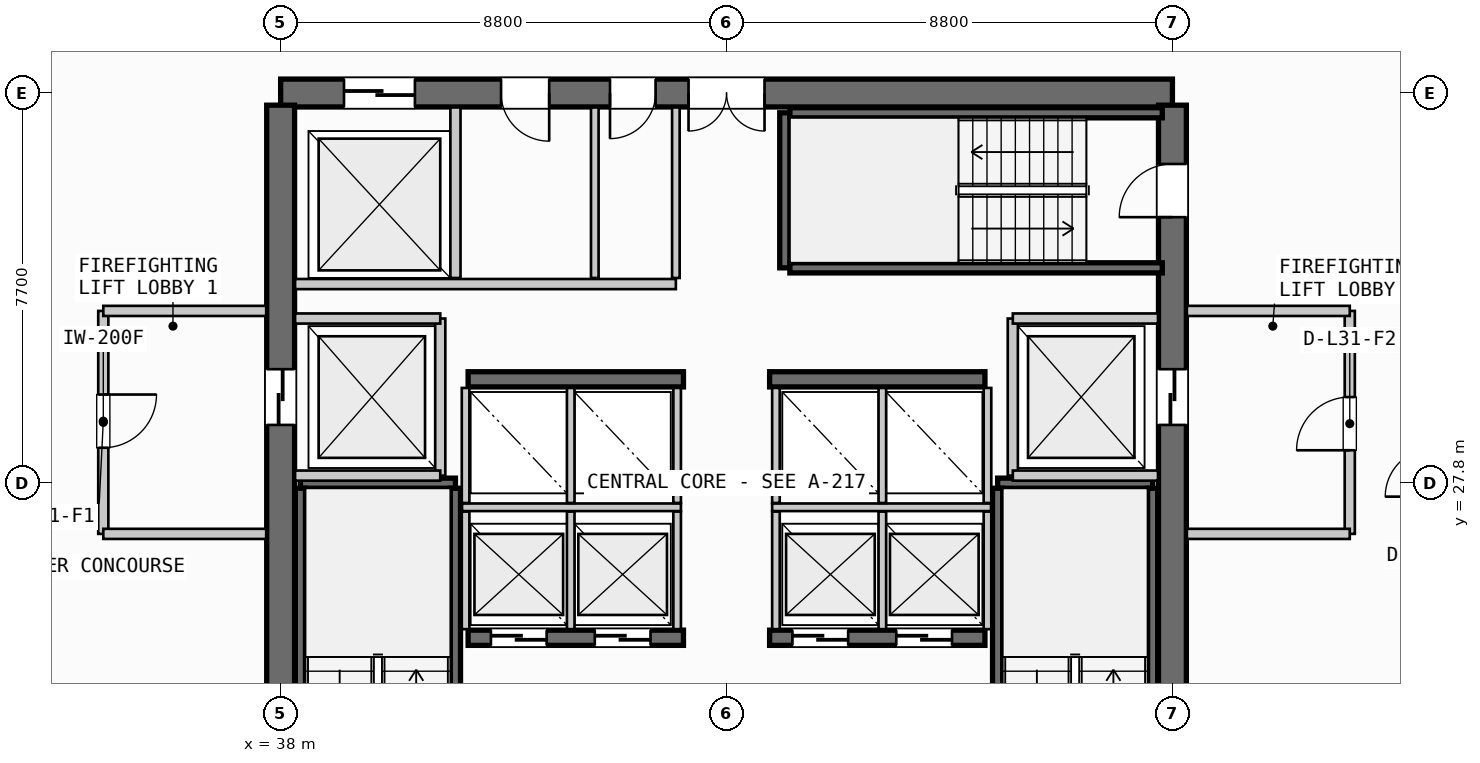
"""IFC4 building model, lengths in metres.
Left out: names, types, materials, properties, quantities, classifications, styles, units other than length and angle.
Written with IfcOpenShell. Run it as: python <this file> out.ifc"""

import sys

from ifc_helpers import new_model, si_unit, direction, frame, frame_2d, origin, place, context, subcontext, project, spatial, rectangle, extrude, source, transform, mapped, element, fill, save


model = new_model("IFC4")
c1 = context("Model", 3, precision=1e-05, world=origin(), true_north=direction((0.0, 1.0)))
c2 = subcontext(c1, "Body", "Model", "MODEL_VIEW")
j1 = project(units=[si_unit("LENGTHUNIT", "METRE"), si_unit("PLANEANGLEUNIT", "RADIAN")], contexts=[c1])
p1 = place(None, origin())
s1 = spatial("IfcSite", under=j1, at=p1, CompositionType="ELEMENT")
p2 = place(p1, origin())
s2 = spatial("IfcBuilding", under=s1, at=p2, CompositionType="ELEMENT")
p3 = place(p2, frame((0.0, 0.0, 125.2)))
s3 = spatial("IfcBuildingStorey", under=s2, at=p3, CompositionType="ELEMENT", Elevation=125.2)
p4 = place(p3, frame((55.6, 35.5, 0.0), z_axis=(0.0, 0.0, 1.0), x_axis=(-1.0, 0.0, 0.0)))
e1 = element("IfcWall", 1, at=p4, inside=s3, PredefinedType="SHEAR", context=c2, shape_type="SweptSolid", body=[
    extrude(rectangle(XDim=17.6, YDim=0.55, at=frame_2d((8.8, 0.0))), origin(), (0.0, 0.0, 1.0), 3.35),
])
p5 = place(p4, frame((8.05, 0.0, 0.0)))
e2 = element("IfcOpeningElement", 2, at=p5, cuts=e1, PredefinedType="OPENING", context=c2, shape_type="SweptSolid", body=[
    extrude(rectangle(XDim=1.5, YDim=2.2, at=frame_2d((0.75, 1.1))), frame((0.0, 0.285, 0.0), z_axis=(0.0, -1.0, 0.0), x_axis=(1.0, 0.0, 0.0)), (0.0, 0.0, 1.0), 0.57),
])
p6 = place(p4, frame((14.95, 0.0, 0.0)))
e3 = element("IfcOpeningElement", 3, at=p6, cuts=e1, PredefinedType="OPENING", context=c2, shape_type="SweptSolid", body=[
    extrude(rectangle(XDim=1.4, YDim=2.3, at=frame_2d((0.7, 1.15))), frame((0.0, 0.285, 0.0), z_axis=(0.0, -1.0, 0.0), x_axis=(1.0, 0.0, 0.0)), (0.0, 0.0, 1.0), 0.57),
])
p7 = place(p4, frame((12.3, 0.0, 0.0)))
e4 = element("IfcOpeningElement", 4, at=p7, cuts=e1, PredefinedType="OPENING", context=c2, shape_type="SweptSolid", body=[
    extrude(rectangle(XDim=0.95, YDim=2.15, at=frame_2d((0.475, 1.075))), frame((0.0, 0.285, 0.0), z_axis=(0.0, -1.0, 0.0), x_axis=(1.0, 0.0, 0.0)), (0.0, 0.0, 1.0), 0.57),
])
p8 = place(p4, frame((10.2, 0.0, 0.0)))
e5 = element("IfcOpeningElement", 5, at=p8, cuts=e1, PredefinedType="OPENING", context=c2, shape_type="SweptSolid", body=[
    extrude(rectangle(XDim=0.9, YDim=2.15, at=frame_2d((0.45, 1.075))), frame((0.0, 0.285, 0.0), z_axis=(0.0, -1.0, 0.0), x_axis=(1.0, 0.0, 0.0)), (0.0, 0.0, 1.0), 0.57),
])
p9 = place(p3, frame((38.0, 35.26, 0.0), z_axis=(0.0, 0.0, 1.0), x_axis=(0.0, -1.0, 0.0)))
e6 = element("IfcWall", 6, at=p9, inside=s3, PredefinedType="SHEAR", context=c2, shape_type="SweptSolid", body=[
    extrude(rectangle(XDim=14.92, YDim=0.55, at=frame_2d((7.46, 0.0))), origin(), (0.0, 0.0, 1.0), 3.35),
])
p10 = place(p9, frame((5.21, 0.0, 0.0)))
e7 = element("IfcOpeningElement", 7, at=p10, cuts=e6, PredefinedType="OPENING", context=c2, shape_type="SweptSolid", body=[
    extrude(rectangle(XDim=1.1, YDim=2.2, at=frame_2d((0.55, 1.1))), frame((0.0, 0.285, 0.0), z_axis=(0.0, -1.0, 0.0), x_axis=(1.0, 0.0, 0.0)), (0.0, 0.0, 1.0), 0.57),
])
p11 = place(p3, frame((55.6, 20.34, 0.0), z_axis=(0.0, 0.0, 1.0), x_axis=(0.0, 1.0, 0.0)))
e8 = element("IfcWall", 8, at=p11, inside=s3, PredefinedType="SHEAR", context=c2, shape_type="SweptSolid", body=[
    extrude(rectangle(XDim=14.92, YDim=0.55, at=frame_2d((7.46, 0.0))), origin(), (0.0, 0.0, 1.0), 3.35),
])
p12 = place(p11, frame((12.71, 0.0, 0.0)))
e9 = element("IfcOpeningElement", 9, at=p12, cuts=e8, PredefinedType="OPENING", context=c2, shape_type="SweptSolid", body=[
    extrude(rectangle(XDim=1.05, YDim=2.15, at=frame_2d((0.525, 1.075))), frame((0.0, 0.285, 0.0), z_axis=(0.0, -1.0, 0.0), x_axis=(1.0, 0.0, 0.0)), (0.0, 0.0, 1.0), 0.57),
])
p13 = place(p11, frame((8.61, 0.0, 0.0)))
e10 = element("IfcOpeningElement", 10, at=p13, cuts=e8, PredefinedType="OPENING", context=c2, shape_type="SweptSolid", body=[
    extrude(rectangle(XDim=1.1, YDim=2.2, at=frame_2d((0.55, 1.1))), frame((0.0, 0.285, 0.0), z_axis=(0.0, -1.0, 0.0), x_axis=(1.0, 0.0, 0.0)), (0.0, 0.0, 1.0), 0.57),
])
p14 = place(p3, frame((41.7, 24.75, 0.0), z_axis=(0.0, 0.0, 1.0), x_axis=(1.0, 0.0, 0.0)))
e11 = element("IfcWall", 11, at=p14, inside=s3, PredefinedType="SHEAR", context=c2, shape_type="SweptSolid", body=[
    extrude(rectangle(XDim=4.25, YDim=0.3, at=frame_2d((2.125, 0.0))), origin(), (0.0, 0.0, 1.0), 3.35),
])
p15 = place(p14, frame((0.45, 0.0, 0.0)))
e12 = element("IfcOpeningElement", 12, at=p15, cuts=e11, PredefinedType="OPENING", context=c2, shape_type="SweptSolid", body=[
    extrude(rectangle(XDim=1.1, YDim=2.2, at=frame_2d((0.55, 1.1))), frame((0.0, 0.16, 0.0), z_axis=(0.0, -1.0, 0.0), x_axis=(1.0, 0.0, 0.0)), (0.0, 0.0, 1.0), 0.32),
])
p16 = place(p14, frame((2.5, 0.0, 0.0)))
e13 = element("IfcOpeningElement", 13, at=p16, cuts=e11, PredefinedType="OPENING", context=c2, shape_type="SweptSolid", body=[
    extrude(rectangle(XDim=1.1, YDim=2.2, at=frame_2d((0.55, 1.1))), frame((0.0, 0.16, 0.0), z_axis=(0.0, -1.0, 0.0), x_axis=(1.0, 0.0, 0.0)), (0.0, 0.0, 1.0), 0.32),
])
p17 = place(p3, frame((47.65, 24.75, 0.0), z_axis=(0.0, 0.0, 1.0), x_axis=(1.0, 0.0, 0.0)))
e14 = element("IfcWall", 14, at=p17, inside=s3, PredefinedType="SHEAR", context=c2, shape_type="SweptSolid", body=[
    extrude(rectangle(XDim=4.25, YDim=0.3, at=frame_2d((2.125, 0.0))), origin(), (0.0, 0.0, 1.0), 3.35),
])
p18 = place(p17, frame((0.45, 0.0, 0.0)))
e15 = element("IfcOpeningElement", 15, at=p18, cuts=e14, PredefinedType="OPENING", context=c2, shape_type="SweptSolid", body=[
    extrude(rectangle(XDim=1.1, YDim=2.2, at=frame_2d((0.55, 1.1))), frame((0.0, 0.16, 0.0), z_axis=(0.0, -1.0, 0.0), x_axis=(1.0, 0.0, 0.0)), (0.0, 0.0, 1.0), 0.32),
])
p19 = place(p17, frame((2.5, 0.0, 0.0)))
e16 = element("IfcOpeningElement", 16, at=p19, cuts=e14, PredefinedType="OPENING", context=c2, shape_type="SweptSolid", body=[
    extrude(rectangle(XDim=1.1, YDim=2.2, at=frame_2d((0.55, 1.1))), frame((0.0, 0.16, 0.0), z_axis=(0.0, -1.0, 0.0), x_axis=(1.0, 0.0, 0.0)), (0.0, 0.0, 1.0), 0.32),
])
for number, where, z_axis, x_axis in (
    (17, (41.7, 29.85, 0.0), (0.0, 0.0, 1.0), (1.0, 0.0, 0.0)),
    (18, (47.65, 29.85, 0.0), (0.0, 0.0, 1.0), (1.0, 0.0, 0.0)),
):
    element("IfcWall", number, at=place(p3, frame(where, z_axis=z_axis, x_axis=x_axis)), inside=s3, PredefinedType="SHEAR", context=c2, shape_type="SweptSolid", body=[
        extrude(rectangle(XDim=4.25, YDim=0.3, at=frame_2d((2.125, 0.0))), origin(), (0.0, 0.0, 1.0), 3.35),
    ])
p20 = place(p3, frame((38.39, 27.8, 0.0), z_axis=(0.0, 0.0, 1.0), x_axis=(1.0, 0.0, 0.0)))
e19 = element("IfcWall", 19, at=p20, inside=s3, PredefinedType="SHEAR", context=c2, shape_type="SweptSolid", body=[
    extrude(rectangle(XDim=3.06, YDim=0.2, at=frame_2d((1.53, 0.0))), origin(), (0.0, 0.0, 1.0), 3.35),
])
for number, where, z_axis, x_axis in (
    (20, (41.45, 27.7, 0.0), (0.0, 0.0, 1.0), (0.0, -1.0, 0.0)),
    (21, (38.39, 20.35, 0.0), (0.0, 0.0, 1.0), (0.0, 1.0, 0.0)),
):
    element("IfcWall", number, at=place(p3, frame(where, z_axis=z_axis, x_axis=x_axis)), inside=s3, PredefinedType="SHEAR", context=c2, shape_type="SweptSolid", body=[
        extrude(rectangle(XDim=7.35, YDim=0.2, at=frame_2d((3.675, 0.0))), origin(), (0.0, 0.0, 1.0), 3.35),
    ])
p21 = place(p3, frame((52.15, 27.8, 0.0), z_axis=(0.0, 0.0, 1.0), x_axis=(1.0, 0.0, 0.0)))
e22 = element("IfcWall", 22, at=p21, inside=s3, PredefinedType="SHEAR", context=c2, shape_type="SweptSolid", body=[
    extrude(rectangle(XDim=3.06, YDim=0.2, at=frame_2d((1.53, 0.0))), origin(), (0.0, 0.0, 1.0), 3.35),
])
for number, where, z_axis, x_axis in (
    (23, (55.21, 27.7, 0.0), (0.0, 0.0, 1.0), (0.0, -1.0, 0.0)),
    (24, (52.15, 20.35, 0.0), (0.0, 0.0, 1.0), (0.0, 1.0, 0.0)),
):
    element("IfcWall", number, at=place(p3, frame(where, z_axis=z_axis, x_axis=x_axis)), inside=s3, PredefinedType="SHEAR", context=c2, shape_type="SweptSolid", body=[
        extrude(rectangle(XDim=7.35, YDim=0.2, at=frame_2d((3.675, 0.0))), origin(), (0.0, 0.0, 1.0), 3.35),
    ])
p22 = place(p3, frame((47.95, 32.05, 0.0), z_axis=(0.0, 0.0, 1.0), x_axis=(0.0, 1.0, 0.0)))
e25 = element("IfcWall", 25, at=p22, inside=s3, PredefinedType="SHEAR", context=c2, shape_type="SweptSolid", body=[
    extrude(rectangle(XDim=3.06, YDim=0.2, at=frame_2d((1.53, 0.0))), origin(), (0.0, 0.0, 1.0), 3.35),
])
for number, where, z_axis, x_axis in (
    (26, (48.05, 35.11, 0.0), (0.0, 0.0, 1.0), (1.0, 0.0, 0.0)),
    (27, (55.4, 32.05, 0.0), (0.0, 0.0, 1.0), (-1.0, 0.0, 0.0)),
):
    element("IfcWall", number, at=place(p3, frame(where, z_axis=z_axis, x_axis=x_axis)), inside=s3, PredefinedType="SHEAR", context=c2, shape_type="SweptSolid", body=[
        extrude(rectangle(XDim=7.35, YDim=0.2, at=frame_2d((3.675, 0.0))), origin(), (0.0, 0.0, 1.0), 3.35),
    ])
p23 = place(p3, frame((41.15, 27.95, 0.0), z_axis=(0.0, 0.0, 1.0), x_axis=(0.0, 1.0, 0.0)))
e28 = element("IfcWall", 28, at=p23, inside=s3, PredefinedType="PARTITIONING", context=c2, shape_type="SweptSolid", body=[
    extrude(rectangle(XDim=3.1, YDim=0.2, at=frame_2d((1.55, 0.0))), origin(), (0.0, 0.0, 1.0), 2.635),
])
for number, where, z_axis, x_axis in (
    (29, (38.285, 27.95, 0.0), (0.0, 0.0, 1.0), (1.0, 0.0, 0.0)),
    (30, (38.285, 31.05, 0.0), (0.0, 0.0, 1.0), (1.0, 0.0, 0.0)),
):
    element("IfcWall", number, at=place(p3, frame(where, z_axis=z_axis, x_axis=x_axis)), inside=s3, PredefinedType="PARTITIONING", context=c2, shape_type="SweptSolid", body=[
        extrude(rectangle(XDim=2.865, YDim=0.2, at=frame_2d((1.433, 0.0))), origin(), (0.0, 0.0, 1.0), 2.635),
    ])
p24 = place(p3, frame((34.5, 31.2, 0.0), z_axis=(0.0, 0.0, 1.0), x_axis=(0.0, -1.0, 0.0)))
e31 = element("IfcWall", 31, at=p24, inside=s3, PredefinedType="PARTITIONING", context=c2, shape_type="SweptSolid", body=[
    extrude(rectangle(XDim=4.4, YDim=0.2, at=frame_2d((2.2, 0.0))), origin(), (0.0, 0.0, 1.0), 2.635),
])
p25 = place(p24, frame((1.65, 0.0, 0.0)))
e32 = element("IfcOpeningElement", 32, at=p25, cuts=e31, PredefinedType="OPENING", context=c2, shape_type="SweptSolid", body=[
    extrude(rectangle(XDim=1.05, YDim=2.15, at=frame_2d((0.525, 1.075))), frame((0.0, 0.11, 0.0), z_axis=(0.0, -1.0, 0.0), x_axis=(1.0, 0.0, 0.0)), (0.0, 0.0, 1.0), 0.22),
])
for number, where, z_axis, x_axis in (
    (33, (34.5, 26.8, 0.0), (0.0, 0.0, 1.0), (1.0, 0.0, 0.0)),
    (34, (34.5, 31.2, 0.0), (0.0, 0.0, 1.0), (1.0, 0.0, 0.0)),
):
    element("IfcWall", number, at=place(p3, frame(where, z_axis=z_axis, x_axis=x_axis)), inside=s3, PredefinedType="PARTITIONING", context=c2, shape_type="SweptSolid", body=[
        extrude(rectangle(XDim=3.215, YDim=0.2, at=frame_2d((1.607, 0.0))), origin(), (0.0, 0.0, 1.0), 2.635),
    ])
p26 = place(p3, frame((52.45, 27.95, 0.0), z_axis=(0.0, 0.0, 1.0), x_axis=(0.0, 1.0, 0.0)))
e35 = element("IfcWall", 35, at=p26, inside=s3, PredefinedType="PARTITIONING", context=c2, shape_type="SweptSolid", body=[
    extrude(rectangle(XDim=3.1, YDim=0.2, at=frame_2d((1.55, 0.0))), origin(), (0.0, 0.0, 1.0), 2.635),
])
for number, where, z_axis, x_axis in (
    (36, (52.45, 27.95, 0.0), (0.0, 0.0, 1.0), (1.0, 0.0, 0.0)),
    (37, (52.45, 31.05, 0.0), (0.0, 0.0, 1.0), (1.0, 0.0, 0.0)),
):
    element("IfcWall", number, at=place(p3, frame(where, z_axis=z_axis, x_axis=x_axis)), inside=s3, PredefinedType="PARTITIONING", context=c2, shape_type="SweptSolid", body=[
        extrude(rectangle(XDim=2.865, YDim=0.2, at=frame_2d((1.433, 0.0))), origin(), (0.0, 0.0, 1.0), 2.635),
    ])
p27 = place(p3, frame((59.1, 26.8, 0.0), z_axis=(0.0, 0.0, 1.0), x_axis=(0.0, 1.0, 0.0)))
e38 = element("IfcWall", 38, at=p27, inside=s3, PredefinedType="PARTITIONING", context=c2, shape_type="SweptSolid", body=[
    extrude(rectangle(XDim=4.4, YDim=0.2, at=frame_2d((2.2, 0.0))), origin(), (0.0, 0.0, 1.0), 2.635),
])
p28 = place(p27, frame((1.65, 0.0, 0.0)))
e39 = element("IfcOpeningElement", 39, at=p28, cuts=e38, PredefinedType="OPENING", context=c2, shape_type="SweptSolid", body=[
    extrude(rectangle(XDim=1.05, YDim=2.15, at=frame_2d((0.525, 1.075))), frame((0.0, 0.11, 0.0), z_axis=(0.0, -1.0, 0.0), x_axis=(1.0, 0.0, 0.0)), (0.0, 0.0, 1.0), 0.22),
])
for number, where, z_axis, x_axis in (
    (40, (55.885, 26.8, 0.0), (0.0, 0.0, 1.0), (1.0, 0.0, 0.0)),
    (41, (55.885, 31.2, 0.0), (0.0, 0.0, 1.0), (1.0, 0.0, 0.0)),
):
    element("IfcWall", number, at=place(p3, frame(where, z_axis=z_axis, x_axis=x_axis)), inside=s3, PredefinedType="PARTITIONING", context=c2, shape_type="SweptSolid", body=[
        extrude(rectangle(XDim=3.215, YDim=0.2, at=frame_2d((1.607, 0.0))), origin(), (0.0, 0.0, 1.0), 2.635),
    ])
p29 = place(p3, frame((41.58, 27.325, 0.0), z_axis=(0.0, 0.0, 1.0), x_axis=(1.0, 0.0, 0.0)))
e42 = element("IfcWall", 42, at=p29, inside=s3, PredefinedType="PARTITIONING", context=c2, shape_type="SweptSolid", body=[
    extrude(rectangle(XDim=4.32, YDim=0.15, at=frame_2d((2.16, 0.0))), origin(), (0.0, 0.0, 1.0), 2.635),
])
p30 = place(p3, frame((47.7, 27.325, 0.0), z_axis=(0.0, 0.0, 1.0), x_axis=(1.0, 0.0, 0.0)))
e43 = element("IfcWall", 43, at=p30, inside=s3, PredefinedType="PARTITIONING", context=c2, shape_type="SweptSolid", body=[
    extrude(rectangle(XDim=4.32, YDim=0.15, at=frame_2d((2.16, 0.0))), origin(), (0.0, 0.0, 1.0), 2.635),
])
for number, where, z_axis, x_axis in (
    (44, (41.65, 24.92, 0.0), (0.0, 0.0, 1.0), (0.0, 1.0, 0.0)),
    (45, (43.725, 24.92, 0.0), (0.0, 0.0, 1.0), (0.0, 1.0, 0.0)),
    (46, (45.825, 24.92, 0.0), (0.0, 0.0, 1.0), (0.0, 1.0, 0.0)),
    (47, (47.775, 24.92, 0.0), (0.0, 0.0, 1.0), (0.0, 1.0, 0.0)),
    (48, (49.875, 24.92, 0.0), (0.0, 0.0, 1.0), (0.0, 1.0, 0.0)),
    (49, (51.95, 24.92, 0.0), (0.0, 0.0, 1.0), (0.0, 1.0, 0.0)),
):
    element("IfcWall", number, at=place(p3, frame(where, z_axis=z_axis, x_axis=x_axis)), inside=s3, PredefinedType="PARTITIONING", context=c2, shape_type="SweptSolid", body=[
        extrude(rectangle(XDim=2.32, YDim=0.15, at=frame_2d((1.16, 0.0))), origin(), (0.0, 0.0, 1.0), 2.635),
    ])
for number, where, z_axis, x_axis in (
    (50, (41.65, 27.41, 0.0), (0.0, 0.0, 1.0), (0.0, 1.0, 0.0)),
    (51, (43.725, 27.41, 0.0), (0.0, 0.0, 1.0), (0.0, 1.0, 0.0)),
    (52, (45.825, 27.41, 0.0), (0.0, 0.0, 1.0), (0.0, 1.0, 0.0)),
    (53, (47.775, 27.41, 0.0), (0.0, 0.0, 1.0), (0.0, 1.0, 0.0)),
    (54, (49.875, 27.41, 0.0), (0.0, 0.0, 1.0), (0.0, 1.0, 0.0)),
    (55, (51.95, 27.41, 0.0), (0.0, 0.0, 1.0), (0.0, 1.0, 0.0)),
):
    element("IfcWall", number, at=place(p3, frame(where, z_axis=z_axis, x_axis=x_axis)), inside=s3, PredefinedType="PARTITIONING", context=c2, shape_type="SweptSolid", body=[
        extrude(rectangle(XDim=2.27, YDim=0.15, at=frame_2d((1.135, 0.0))), origin(), (0.0, 0.0, 1.0), 2.635),
    ])
p31 = place(p3, frame((41.45, 31.85, 0.0), z_axis=(0.0, 0.0, 1.0), x_axis=(0.0, 1.0, 0.0)))
e56 = element("IfcWall", 56, at=p31, inside=s3, PredefinedType="PARTITIONING", context=c2, shape_type="SweptSolid", body=[
    extrude(rectangle(XDim=3.365, YDim=0.2, at=frame_2d((1.683, 0.0))), origin(), (0.0, 0.0, 1.0), 2.635),
])
p32 = place(p3, frame((38.285, 31.73, 0.0), z_axis=(0.0, 0.0, 1.0), x_axis=(1.0, 0.0, 0.0)))
e57 = element("IfcWall", 57, at=p32, inside=s3, PredefinedType="PARTITIONING", context=c2, shape_type="SweptSolid", body=[
    extrude(rectangle(XDim=7.515, YDim=0.2, at=frame_2d((3.758, 0.0))), origin(), (0.0, 0.0, 1.0), 2.635),
])
p33 = place(p3, frame((45.8, 31.85, 0.0), z_axis=(0.0, 0.0, 1.0), x_axis=(0.0, 1.0, 0.0)))
e58 = element("IfcWall", 58, at=p33, inside=s3, PredefinedType="PARTITIONING", context=c2, shape_type="SweptSolid", body=[
    extrude(rectangle(XDim=3.365, YDim=0.15, at=frame_2d((1.683, 0.0))), origin(), (0.0, 0.0, 1.0), 2.635),
])
p34 = place(p3, frame((44.2, 31.85, 0.0), z_axis=(0.0, 0.0, 1.0), x_axis=(0.0, 1.0, 0.0)))
e59 = element("IfcWall", 59, at=p34, inside=s3, PredefinedType="PLUMBINGWALL", context=c2, shape_type="SweptSolid", body=[
    extrude(rectangle(XDim=3.365, YDim=0.15, at=frame_2d((1.683, 0.0))), origin(), (0.0, 0.0, 1.0), 2.635),
])
m1 = source(origin(), c2, "Body", "SweptSolid", [
    extrude(rectangle(XDim=1.05, YDim=2.15, at=frame_2d((0.525, 1.075))), frame((0.0, 0.025, 0.0), z_axis=(0.0, -1.0, 0.0), x_axis=(1.0, 0.0, 0.0)), (0.0, 0.0, 1.0), 0.05),
])
p35 = place(p12, origin())
e60 = element("IfcDoor", 60, at=p35, inside=s3, OperationType="SINGLE_SWING_LEFT", PredefinedType="DOOR", context=c2, shape_type="MappedRepresentation", body=[
    mapped(m1, transform((0.0, 0.0, 0.0), scale=1.0)),
])
fill(e9, e60)
m2 = source(origin(), c2, "Body", "SweptSolid", [
    extrude(rectangle(XDim=1.5, YDim=2.2, at=frame_2d((0.75, 1.1))), frame((0.0, 0.025, 0.0), z_axis=(0.0, -1.0, 0.0), x_axis=(1.0, 0.0, 0.0)), (0.0, 0.0, 1.0), 0.05),
])
p36 = place(p5, origin())
e61 = element("IfcDoor", 61, at=p36, inside=s3, OperationType="DOUBLE_DOOR_SINGLE_SWING", PredefinedType="DOOR", context=c2, shape_type="MappedRepresentation", body=[
    mapped(m2, transform((0.0, 0.0, 0.0), scale=1.0)),
])
fill(e2, e61)
m3 = source(origin(), c2, "Body", "SweptSolid", [
    extrude(rectangle(XDim=1.1, YDim=2.2, at=frame_2d((0.55, 1.1))), frame((0.0, 0.025, 0.0), z_axis=(0.0, -1.0, 0.0), x_axis=(1.0, 0.0, 0.0)), (0.0, 0.0, 1.0), 0.05),
])
p37 = place(p10, origin())
e62 = element("IfcDoor", 62, at=p37, inside=s3, OperationType="SLIDING_TO_LEFT", PredefinedType="DOOR", context=c2, shape_type="MappedRepresentation", body=[
    mapped(m3, transform((0.0, 0.0, 0.0), scale=1.0)),
])
fill(e7, e62)
p38 = place(p13, origin())
e63 = element("IfcDoor", 63, at=p38, inside=s3, OperationType="SLIDING_TO_RIGHT", PredefinedType="DOOR", context=c2, shape_type="MappedRepresentation", body=[
    mapped(m3, transform((0.0, 0.0, 0.0), scale=1.0)),
])
fill(e10, e63)
p39 = place(p15, origin())
e64 = element("IfcDoor", 64, at=p39, inside=s3, OperationType="SLIDING_TO_RIGHT", PredefinedType="DOOR", context=c2, shape_type="MappedRepresentation", body=[
    mapped(m3, transform((0.0, 0.0, 0.0), scale=1.0)),
])
fill(e12, e64)
p40 = place(p16, origin())
e65 = element("IfcDoor", 65, at=p40, inside=s3, OperationType="SLIDING_TO_RIGHT", PredefinedType="DOOR", context=c2, shape_type="MappedRepresentation", body=[
    mapped(m3, transform((0.0, 0.0, 0.0), scale=1.0)),
])
fill(e13, e65)
p41 = place(p18, origin())
e66 = element("IfcDoor", 66, at=p41, inside=s3, OperationType="SLIDING_TO_RIGHT", PredefinedType="DOOR", context=c2, shape_type="MappedRepresentation", body=[
    mapped(m3, transform((0.0, 0.0, 0.0), scale=1.0)),
])
fill(e15, e66)
p42 = place(p19, origin())
e67 = element("IfcDoor", 67, at=p42, inside=s3, OperationType="SLIDING_TO_RIGHT", PredefinedType="DOOR", context=c2, shape_type="MappedRepresentation", body=[
    mapped(m3, transform((0.0, 0.0, 0.0), scale=1.0)),
])
fill(e16, e67)
m4 = source(origin(), c2, "Body", "SweptSolid", [
    extrude(rectangle(XDim=1.4, YDim=2.3, at=frame_2d((0.7, 1.15))), frame((0.0, 0.025, 0.0), z_axis=(0.0, -1.0, 0.0), x_axis=(1.0, 0.0, 0.0)), (0.0, 0.0, 1.0), 0.05),
])
p43 = place(p6, origin())
e68 = element("IfcDoor", 68, at=p43, inside=s3, OperationType="SLIDING_TO_RIGHT", PredefinedType="DOOR", context=c2, shape_type="MappedRepresentation", body=[
    mapped(m4, transform((0.0, 0.0, 0.0), scale=1.0)),
])
fill(e3, e68)
m5 = source(origin(), c2, "Body", "SweptSolid", [
    extrude(rectangle(XDim=0.95, YDim=2.15, at=frame_2d((0.475, 1.075))), frame((0.0, 0.025, 0.0), z_axis=(0.0, -1.0, 0.0), x_axis=(1.0, 0.0, 0.0)), (0.0, 0.0, 1.0), 0.05),
])
p44 = place(p7, origin())
e69 = element("IfcDoor", 69, at=p44, inside=s3, OperationType="SINGLE_SWING_LEFT", PredefinedType="DOOR", context=c2, shape_type="MappedRepresentation", body=[
    mapped(m5, transform((0.0, 0.0, 0.0), scale=1.0)),
])
fill(e4, e69)
m6 = source(origin(), c2, "Body", "SweptSolid", [
    extrude(rectangle(XDim=0.9, YDim=2.15, at=frame_2d((0.45, 1.075))), frame((0.0, 0.025, 0.0), z_axis=(0.0, -1.0, 0.0), x_axis=(1.0, 0.0, 0.0)), (0.0, 0.0, 1.0), 0.05),
])
p45 = place(p8, origin())
e70 = element("IfcDoor", 70, at=p45, inside=s3, OperationType="SINGLE_SWING_RIGHT", PredefinedType="DOOR", context=c2, shape_type="MappedRepresentation", body=[
    mapped(m6, transform((0.0, 0.0, 0.0), scale=1.0)),
])
fill(e5, e70)
p46 = place(p25, origin())
e71 = element("IfcDoor", 71, at=p46, inside=s3, OperationType="SINGLE_SWING_LEFT", PredefinedType="DOOR", context=c2, shape_type="MappedRepresentation", body=[
    mapped(m1, transform((0.0, 0.0, 0.0), scale=1.0)),
])
fill(e32, e71)
p47 = place(p28, origin())
e72 = element("IfcDoor", 72, at=p47, inside=s3, OperationType="SINGLE_SWING_LEFT", PredefinedType="DOOR", context=c2, shape_type="MappedRepresentation", body=[
    mapped(m1, transform((0.0, 0.0, 0.0), scale=1.0)),
])
fill(e39, e72)
save(model, sys.argv[1])
